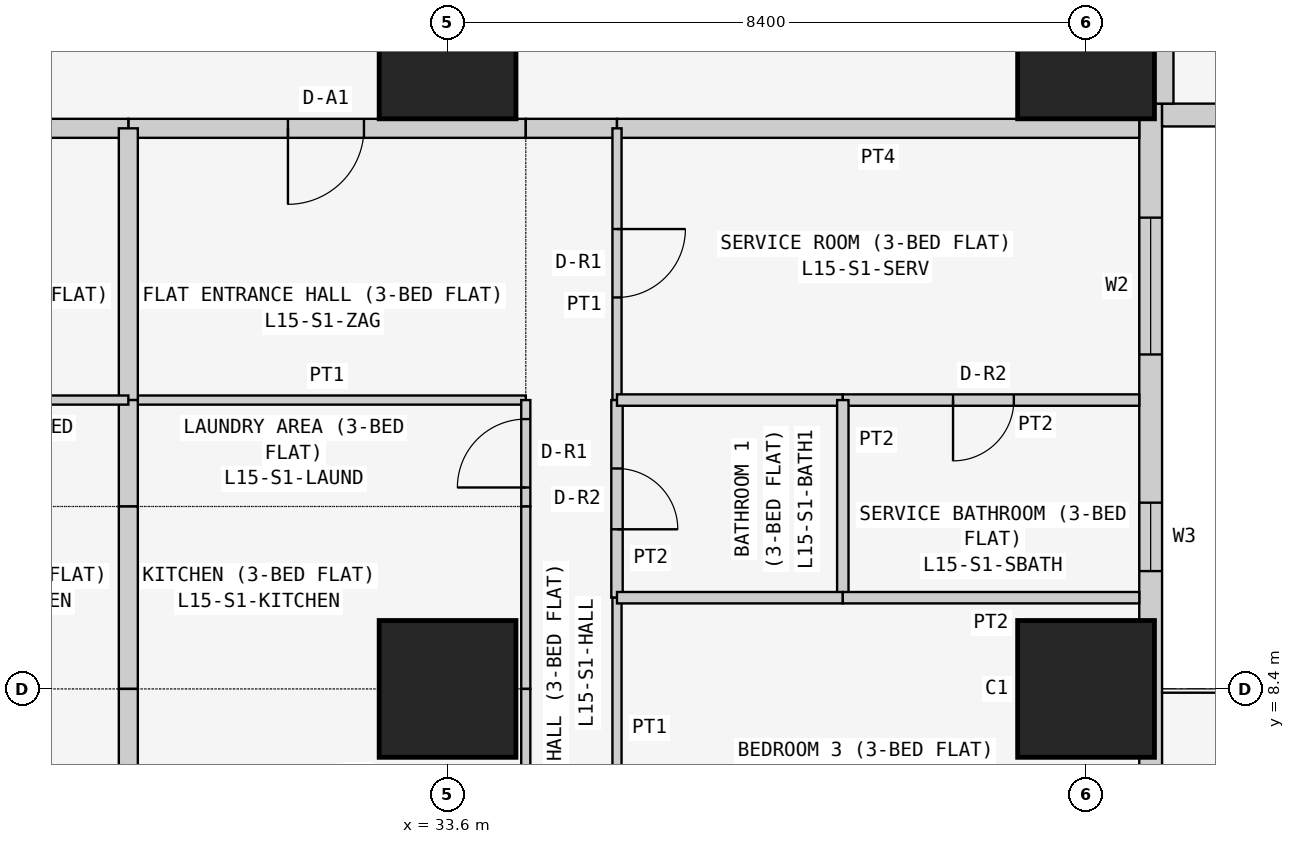
"""IFC4 building model, lengths in metres.
Left out: names, types, materials, properties, quantities, classifications, styles, units other than length and angle.
Written with IfcOpenShell. Run it as: python <this file> out.ifc"""

import sys

from ifc_helpers import new_model, si_unit, direction, frame, frame_2d, origin, origin_2d, place, context, subcontext, project, spatial, rectangle, extrude, element, fill, save


model = new_model("IFC4")
c1 = context("Model", 3, precision=1e-05, world=origin(), true_north=direction((0.0, 1.0)))
c2 = subcontext(c1, "Body", "Model", "MODEL_VIEW")
j1 = project(units=[si_unit("LENGTHUNIT", "METRE"), si_unit("PLANEANGLEUNIT", "RADIAN")], contexts=[c1])
p1 = place(None, origin())
s1 = spatial("IfcSite", under=j1, at=p1, CompositionType="ELEMENT")
p2 = place(p1, origin())
s2 = spatial("IfcBuilding", under=s1, at=p2, CompositionType="ELEMENT")
p3 = place(p2, frame((0.0, 0.0, 63.3)))
s3 = spatial("IfcBuildingStorey", under=s2, at=p3, CompositionType="ELEMENT", Elevation=63.3)
for number, where, z_axis, x_axis in (
    (1, (33.6, 8.4, 0.0), (0.0, 0.0, 1.0), (1.0, 0.0, 0.0)),
    (2, (33.6, 16.8, 0.0), (0.0, 0.0, 1.0), (1.0, 0.0, 0.0)),
    (3, (42.0, 8.4, 0.0), (0.0, 0.0, 1.0), (1.0, 0.0, 0.0)),
    (4, (42.0, 16.8, 0.0), (0.0, 0.0, 1.0), (1.0, 0.0, 0.0)),
):
    element("IfcColumn", number, at=place(p3, frame(where, z_axis=z_axis, x_axis=x_axis)), inside=s3, PredefinedType="COLUMN", context=c2, shape_type="SweptSolid", body=[
        extrude(rectangle(XDim=1.8, YDim=1.8, at=origin_2d()), origin(), (0.0, 0.0, 1.0), 3.6),
    ])
p4 = place(p3, frame((42.85, 0.4, 0.0), z_axis=(0.0, 0.0, 1.0), x_axis=(0.0, 1.0, 0.0)))
e5 = element("IfcWall", 5, at=p4, inside=s3, PredefinedType="SOLIDWALL", context=c2, shape_type="SweptSolid", body=[
    extrude(rectangle(XDim=15.7, YDim=0.3, at=frame_2d((7.85, 0.0))), origin(), (0.0, 0.0, 1.0), 3.45),
])
p5 = place(p4, frame((12.4, 0.0, 0.9)))
e6 = element("IfcOpeningElement", 6, at=p5, cuts=e5, PredefinedType="OPENING", context=c2, shape_type="SweptSolid", body=[
    extrude(rectangle(XDim=1.8, YDim=1.5, at=frame_2d((0.9, 0.75))), frame((0.0, 0.16, 0.0), z_axis=(0.0, -1.0, 0.0), x_axis=(1.0, 0.0, 0.0)), (0.0, 0.0, 1.0), 0.32),
])
p6 = place(p4, frame((9.55, 0.0, 1.5)))
e7 = element("IfcOpeningElement", 7, at=p6, cuts=e5, PredefinedType="OPENING", context=c2, shape_type="SweptSolid", body=[
    extrude(rectangle(XDim=0.9, YDim=0.7, at=frame_2d((0.45, 0.35))), frame((0.0, 0.16, 0.0), z_axis=(0.0, -1.0, 0.0), x_axis=(1.0, 0.0, 0.0)), (0.0, 0.0, 1.0), 0.32),
])
p7 = place(p4, frame((5.1, 0.0, 0.9)))
e8 = element("IfcOpeningElement", 8, at=p7, cuts=e5, PredefinedType="OPENING", context=c2, shape_type="SweptSolid", body=[
    extrude(rectangle(XDim=1.8, YDim=1.5, at=frame_2d((0.9, 0.75))), frame((0.0, 0.16, 0.0), z_axis=(0.0, -1.0, 0.0), x_axis=(1.0, 0.0, 0.0)), (0.0, 0.0, 1.0), 0.32),
])
p8 = place(p4, frame((2.0, 0.0, 0.0)))
e9 = element("IfcOpeningElement", 9, at=p8, cuts=e5, PredefinedType="OPENING", context=c2, shape_type="SweptSolid", body=[
    extrude(rectangle(XDim=0.9, YDim=2.4, at=frame_2d((0.45, 1.2))), frame((0.0, 0.16, 0.0), z_axis=(0.0, -1.0, 0.0), x_axis=(1.0, 0.0, 0.0)), (0.0, 0.0, 1.0), 0.32),
])
p9 = place(p4, frame((0.7, 0.0, 0.9)))
e10 = element("IfcOpeningElement", 10, at=p9, cuts=e5, PredefinedType="OPENING", context=c2, shape_type="SweptSolid", body=[
    extrude(rectangle(XDim=1.2, YDim=1.5, at=frame_2d((0.6, 0.75))), frame((0.0, 0.16, 0.0), z_axis=(0.0, -1.0, 0.0), x_axis=(1.0, 0.0, 0.0)), (0.0, 0.0, 1.0), 0.32),
])
p10 = place(p3, frame((43.0, 15.95, 0.0), z_axis=(0.0, 0.0, 1.0), x_axis=(1.0, 0.0, 0.0)))
e11 = element("IfcWall", 11, at=p10, inside=s3, PredefinedType="SOLIDWALL", context=c2, shape_type="SweptSolid", body=[
    extrude(rectangle(XDim=15.4, YDim=0.3, at=frame_2d((7.7, 0.0))), origin(), (0.0, 0.0, 1.0), 3.45),
])
p11 = place(p10, frame((1.2, 0.0, 0.9)))
e12 = element("IfcOpeningElement", 12, at=p11, cuts=e11, PredefinedType="OPENING", context=c2, shape_type="SweptSolid", body=[
    extrude(rectangle(XDim=1.8, YDim=1.5, at=frame_2d((0.9, 0.75))), frame((0.0, 0.16, 0.0), z_axis=(0.0, -1.0, 0.0), x_axis=(1.0, 0.0, 0.0)), (0.0, 0.0, 1.0), 0.32),
])
p12 = place(p10, frame((4.95, 0.0, 1.5)))
e13 = element("IfcOpeningElement", 13, at=p12, cuts=e11, PredefinedType="OPENING", context=c2, shape_type="SweptSolid", body=[
    extrude(rectangle(XDim=0.9, YDim=0.7, at=frame_2d((0.45, 0.35))), frame((0.0, 0.16, 0.0), z_axis=(0.0, -1.0, 0.0), x_axis=(1.0, 0.0, 0.0)), (0.0, 0.0, 1.0), 0.32),
])
p13 = place(p10, frame((8.5, 0.0, 0.9)))
e14 = element("IfcOpeningElement", 14, at=p13, cuts=e11, PredefinedType="OPENING", context=c2, shape_type="SweptSolid", body=[
    extrude(rectangle(XDim=1.8, YDim=1.5, at=frame_2d((0.9, 0.75))), frame((0.0, 0.16, 0.0), z_axis=(0.0, -1.0, 0.0), x_axis=(1.0, 0.0, 0.0)), (0.0, 0.0, 1.0), 0.32),
])
p14 = place(p10, frame((12.5, 0.0, 0.0)))
e15 = element("IfcOpeningElement", 15, at=p14, cuts=e11, PredefinedType="OPENING", context=c2, shape_type="SweptSolid", body=[
    extrude(rectangle(XDim=0.9, YDim=2.4, at=frame_2d((0.45, 1.2))), frame((0.0, 0.16, 0.0), z_axis=(0.0, -1.0, 0.0), x_axis=(1.0, 0.0, 0.0)), (0.0, 0.0, 1.0), 0.32),
])
p15 = place(p10, frame((13.5, 0.0, 0.9)))
e16 = element("IfcOpeningElement", 16, at=p15, cuts=e11, PredefinedType="OPENING", context=c2, shape_type="SweptSolid", body=[
    extrude(rectangle(XDim=1.2, YDim=1.5, at=frame_2d((0.6, 0.75))), frame((0.0, 0.16, 0.0), z_axis=(0.0, -1.0, 0.0), x_axis=(1.0, 0.0, 0.0)), (0.0, 0.0, 1.0), 0.32),
])
p16 = place(p3, frame((43.025, 22.971, 0.0), z_axis=(0.0, 0.0, 1.0), x_axis=(0.0, -1.0, 0.0)))
e17 = element("IfcWall", 17, at=p16, inside=s3, PredefinedType="PARTITIONING", context=c2, shape_type="SweptSolid", body=[
    extrude(rectangle(XDim=6.871, YDim=0.25, at=frame_2d((3.436, 0.0))), origin(), (0.0, 0.0, 1.0), 3.45),
])
p17 = place(p3, frame((34.629, 15.775, 0.0), z_axis=(0.0, 0.0, 1.0), x_axis=(-1.0, 0.0, 0.0)))
e18 = element("IfcWall", 18, at=p17, inside=s3, PredefinedType="PARTITIONING", context=c2, shape_type="SweptSolid", body=[
    extrude(rectangle(XDim=5.229, YDim=0.25, at=frame_2d((2.615, 0.0))), origin(), (0.0, 0.0, 1.0), 3.45),
])
p18 = place(p17, frame((2.129, 0.0, 0.0)))
e19 = element("IfcOpeningElement", 19, at=p18, cuts=e18, PredefinedType="OPENING", context=c2, shape_type="SweptSolid", body=[
    extrude(rectangle(XDim=1.0, YDim=2.1, at=frame_2d((0.5, 1.05))), frame((0.0, 0.135, 0.0), z_axis=(0.0, -1.0, 0.0), x_axis=(1.0, 0.0, 0.0)), (0.0, 0.0, 1.0), 0.27),
])
p19 = place(p3, frame((35.829, 15.775, 0.0), z_axis=(0.0, 0.0, 1.0), x_axis=(-1.0, 0.0, 0.0)))
e20 = element("IfcWall", 20, at=p19, inside=s3, PredefinedType="PARTITIONING", context=c2, shape_type="SweptSolid", body=[
    extrude(rectangle(XDim=1.2, YDim=0.25, at=frame_2d((0.6, 0.0))), origin(), (0.0, 0.0, 1.0), 3.45),
])
p20 = place(p3, frame((42.7, 15.775, 0.0), z_axis=(0.0, 0.0, 1.0), x_axis=(-1.0, 0.0, 0.0)))
e21 = element("IfcWall", 21, at=p20, inside=s3, PredefinedType="PARTITIONING", context=c2, shape_type="SweptSolid", body=[
    extrude(rectangle(XDim=6.871, YDim=0.25, at=frame_2d((3.436, 0.0))), origin(), (0.0, 0.0, 1.0), 3.45),
])
p21 = place(p3, frame((29.4, 15.775, 0.0), z_axis=(0.0, 0.0, 1.0), x_axis=(-1.0, 0.0, 0.0)))
e22 = element("IfcWall", 22, at=p21, inside=s3, PredefinedType="PARTITIONING", context=c2, shape_type="SweptSolid", body=[
    extrude(rectangle(XDim=5.229, YDim=0.25, at=frame_2d((2.615, 0.0))), origin(), (0.0, 0.0, 1.0), 3.45),
])
p22 = place(p21, frame((2.1, 0.0, 0.0)))
e23 = element("IfcOpeningElement", 23, at=p22, cuts=e22, PredefinedType="OPENING", context=c2, shape_type="SweptSolid", body=[
    extrude(rectangle(XDim=1.0, YDim=2.1, at=frame_2d((0.5, 1.05))), frame((0.0, 0.135, 0.0), z_axis=(0.0, -1.0, 0.0), x_axis=(1.0, 0.0, 0.0)), (0.0, 0.0, 1.0), 0.27),
])
p23 = place(p3, frame((29.4, 12.2, 0.0), z_axis=(0.0, 0.0, 1.0), x_axis=(1.0, 0.0, 0.0)))
e24 = element("IfcWall", 24, at=p23, inside=s3, PredefinedType="PARTITIONING", context=c2, shape_type="SweptSolid", body=[
    extrude(rectangle(XDim=5.229, YDim=0.12, at=frame_2d((2.615, 0.0))), origin(), (0.0, 0.0, 1.0), 3.45),
])
p24 = place(p3, frame((29.4, 15.775, 0.0), z_axis=(0.0, 0.0, 1.0), x_axis=(0.0, -1.0, 0.0)))
e25 = element("IfcWall", 25, at=p24, inside=s3, PredefinedType="PARTITIONING", context=c2, shape_type="SweptSolid", body=[
    extrude(rectangle(XDim=3.575, YDim=0.25, at=frame_2d((1.788, 0.0))), origin(), (0.0, 0.0, 1.0), 2.848),
])
p25 = place(p3, frame((34.629, 10.8, 0.0), z_axis=(0.0, 0.0, 1.0), x_axis=(0.0, 1.0, 0.0)))
e26 = element("IfcWall", 26, at=p25, inside=s3, PredefinedType="PARTITIONING", context=c2, shape_type="SweptSolid", body=[
    extrude(rectangle(XDim=1.4, YDim=0.12, at=frame_2d((0.7, 0.0))), origin(), (0.0, 0.0, 1.0), 3.45),
])
p26 = place(p25, frame((0.25, 0.0, 0.0)))
e27 = element("IfcOpeningElement", 27, at=p26, cuts=e26, PredefinedType="OPENING", context=c2, shape_type="SweptSolid", body=[
    extrude(rectangle(XDim=0.9, YDim=2.1, at=frame_2d((0.45, 1.05))), frame((0.0, 0.07, 0.0), z_axis=(0.0, -1.0, 0.0), x_axis=(1.0, 0.0, 0.0)), (0.0, 0.0, 1.0), 0.14),
])
p27 = place(p3, frame((29.4, 12.2, 0.0), z_axis=(0.0, 0.0, 1.0), x_axis=(0.0, -1.0, 0.0)))
e28 = element("IfcWall", 28, at=p27, inside=s3, PredefinedType="PARTITIONING", context=c2, shape_type="SweptSolid", body=[
    extrude(rectangle(XDim=1.4, YDim=0.25, at=frame_2d((0.7, 0.0))), origin(), (0.0, 0.0, 1.0), 2.848),
])
p28 = place(p3, frame((34.629, 8.4, 0.0), z_axis=(0.0, 0.0, 1.0), x_axis=(0.0, 1.0, 0.0)))
e29 = element("IfcWall", 29, at=p28, inside=s3, PredefinedType="PARTITIONING", context=c2, shape_type="SweptSolid", body=[
    extrude(rectangle(XDim=2.4, YDim=0.12, at=frame_2d((1.2, 0.0))), origin(), (0.0, 0.0, 1.0), 3.45),
])
p29 = place(p3, frame((29.4, 10.8, 0.0), z_axis=(0.0, 0.0, 1.0), x_axis=(0.0, -1.0, 0.0)))
e30 = element("IfcWall", 30, at=p29, inside=s3, PredefinedType="PARTITIONING", context=c2, shape_type="SweptSolid", body=[
    extrude(rectangle(XDim=2.4, YDim=0.25, at=frame_2d((1.2, 0.0))), origin(), (0.0, 0.0, 1.0), 2.848),
])
p30 = place(p3, frame((34.629, 3.5, 0.0), z_axis=(0.0, 0.0, 1.0), x_axis=(0.0, 1.0, 0.0)))
e31 = element("IfcWall", 31, at=p30, inside=s3, PredefinedType="PARTITIONING", context=c2, shape_type="SweptSolid", body=[
    extrude(rectangle(XDim=4.9, YDim=0.12, at=frame_2d((2.45, 0.0))), origin(), (0.0, 0.0, 1.0), 3.45),
])
p31 = place(p30, frame((1.25, 0.0, 0.0)))
e32 = element("IfcOpeningElement", 32, at=p31, cuts=e31, PredefinedType="OPENING", context=c2, shape_type="SweptSolid", body=[
    extrude(rectangle(XDim=0.9, YDim=2.1, at=frame_2d((0.45, 1.05))), frame((0.0, 0.07, 0.0), z_axis=(0.0, -1.0, 0.0), x_axis=(1.0, 0.0, 0.0)), (0.0, 0.0, 1.0), 0.14),
])
p32 = place(p3, frame((29.4, 8.4, 0.0), z_axis=(0.0, 0.0, 1.0), x_axis=(0.0, -1.0, 0.0)))
e33 = element("IfcWall", 33, at=p32, inside=s3, PredefinedType="PARTITIONING", context=c2, shape_type="SweptSolid", body=[
    extrude(rectangle(XDim=9.05, YDim=0.25, at=frame_2d((4.525, 0.0))), origin(), (0.0, 0.0, 1.0), 2.848),
])
p33 = place(p3, frame((35.829, 12.2, 0.0), z_axis=(0.0, 0.0, 1.0), x_axis=(0.0, 1.0, 0.0)))
e34 = element("IfcWall", 34, at=p33, inside=s3, PredefinedType="PARTITIONING", context=c2, shape_type="SweptSolid", body=[
    extrude(rectangle(XDim=3.575, YDim=0.12, at=frame_2d((1.788, 0.0))), origin(), (0.0, 0.0, 1.0), 3.45),
])
p34 = place(p33, frame((1.35, 0.0, 0.0)))
e35 = element("IfcOpeningElement", 35, at=p34, cuts=e34, PredefinedType="OPENING", context=c2, shape_type="SweptSolid", body=[
    extrude(rectangle(XDim=0.9, YDim=2.1, at=frame_2d((0.45, 1.05))), frame((0.0, 0.07, 0.0), z_axis=(0.0, -1.0, 0.0), x_axis=(1.0, 0.0, 0.0)), (0.0, 0.0, 1.0), 0.14),
])
p35 = place(p3, frame((35.829, 9.6, 0.0), z_axis=(0.0, 0.0, 1.0), x_axis=(0.0, 1.0, 0.0)))
e36 = element("IfcWall", 36, at=p35, inside=s3, PredefinedType="PARTITIONING", context=c2, shape_type="SweptSolid", body=[
    extrude(rectangle(XDim=2.6, YDim=0.15, at=frame_2d((1.3, 0.0))), origin(), (0.0, 0.0, 1.0), 3.45),
])
p36 = place(p35, frame((0.9, 0.0, 0.0)))
e37 = element("IfcOpeningElement", 37, at=p36, cuts=e36, PredefinedType="OPENING", context=c2, shape_type="SweptSolid", body=[
    extrude(rectangle(XDim=0.8, YDim=2.1, at=frame_2d((0.4, 1.05))), frame((0.0, 0.085, 0.0), z_axis=(0.0, -1.0, 0.0), x_axis=(1.0, 0.0, 0.0)), (0.0, 0.0, 1.0), 0.17),
])
p37 = place(p3, frame((35.829, 4.7, 0.0), z_axis=(0.0, 0.0, 1.0), x_axis=(0.0, 1.0, 0.0)))
e38 = element("IfcWall", 38, at=p37, inside=s3, PredefinedType="PARTITIONING", context=c2, shape_type="SweptSolid", body=[
    extrude(rectangle(XDim=4.9, YDim=0.12, at=frame_2d((2.45, 0.0))), origin(), (0.0, 0.0, 1.0), 3.45),
])
p38 = place(p37, frame((1.65, 0.0, 0.0)))
e39 = element("IfcOpeningElement", 39, at=p38, cuts=e38, PredefinedType="OPENING", context=c2, shape_type="SweptSolid", body=[
    extrude(rectangle(XDim=0.9, YDim=2.1, at=frame_2d((0.45, 1.05))), frame((0.0, 0.07, 0.0), z_axis=(0.0, -1.0, 0.0), x_axis=(1.0, 0.0, 0.0)), (0.0, 0.0, 1.0), 0.14),
])
p39 = place(p3, frame((35.829, 12.2, 0.0), z_axis=(0.0, 0.0, 1.0), x_axis=(1.0, 0.0, 0.0)))
e40 = element("IfcWall", 40, at=p39, inside=s3, PredefinedType="PARTITIONING", context=c2, shape_type="SweptSolid", body=[
    extrude(rectangle(XDim=2.971, YDim=0.15, at=frame_2d((1.485, 0.0))), origin(), (0.0, 0.0, 1.0), 3.45),
])
p40 = place(p3, frame((38.8, 12.2, 0.0), z_axis=(0.0, 0.0, 1.0), x_axis=(1.0, 0.0, 0.0)))
e41 = element("IfcWall", 41, at=p40, inside=s3, PredefinedType="PARTITIONING", context=c2, shape_type="SweptSolid", body=[
    extrude(rectangle(XDim=3.9, YDim=0.15, at=frame_2d((1.95, 0.0))), origin(), (0.0, 0.0, 1.0), 3.45),
])
p41 = place(p40, frame((1.45, 0.0, 0.0)))
e42 = element("IfcOpeningElement", 42, at=p41, cuts=e41, PredefinedType="OPENING", context=c2, shape_type="SweptSolid", body=[
    extrude(rectangle(XDim=0.8, YDim=2.1, at=frame_2d((0.4, 1.05))), frame((0.0, 0.085, 0.0), z_axis=(0.0, -1.0, 0.0), x_axis=(1.0, 0.0, 0.0)), (0.0, 0.0, 1.0), 0.17),
])
p42 = place(p3, frame((38.8, 9.6, 0.0), z_axis=(0.0, 0.0, 1.0), x_axis=(0.0, 1.0, 0.0)))
e43 = element("IfcWall", 43, at=p42, inside=s3, PredefinedType="PARTITIONING", context=c2, shape_type="SweptSolid", body=[
    extrude(rectangle(XDim=2.6, YDim=0.15, at=frame_2d((1.3, 0.0))), origin(), (0.0, 0.0, 1.0), 3.45),
])
p43 = place(p3, frame((35.829, 9.6, 0.0), z_axis=(0.0, 0.0, 1.0), x_axis=(1.0, 0.0, 0.0)))
e44 = element("IfcWall", 44, at=p43, inside=s3, PredefinedType="PARTITIONING", context=c2, shape_type="SweptSolid", body=[
    extrude(rectangle(XDim=2.971, YDim=0.15, at=frame_2d((1.485, 0.0))), origin(), (0.0, 0.0, 1.0), 3.45),
])
p44 = place(p3, frame((38.8, 9.6, 0.0), z_axis=(0.0, 0.0, 1.0), x_axis=(1.0, 0.0, 0.0)))
e45 = element("IfcWall", 45, at=p44, inside=s3, PredefinedType="PARTITIONING", context=c2, shape_type="SweptSolid", body=[
    extrude(rectangle(XDim=3.9, YDim=0.15, at=frame_2d((1.95, 0.0))), origin(), (0.0, 0.0, 1.0), 3.45),
])
p45 = place(p3, frame((29.4, 12.2, 0.0), z_axis=(0.0, 0.0, 1.0), x_axis=(-1.0, 0.0, 0.0)))
e46 = element("IfcWall", 46, at=p45, inside=s3, PredefinedType="PARTITIONING", context=c2, shape_type="SweptSolid", body=[
    extrude(rectangle(XDim=5.229, YDim=0.12, at=frame_2d((2.615, 0.0))), origin(), (0.0, 0.0, 1.0), 3.45),
])
p46 = place(p5, origin())
e47 = element("IfcWindow", 47, at=p46, inside=s3, PartitioningType="SINGLE_PANEL", PredefinedType="WINDOW", context=c2, shape_type="SweptSolid", body=[
    extrude(rectangle(XDim=1.8, YDim=1.5, at=frame_2d((0.9, 0.75))), frame((0.0, 0.03, 0.0), z_axis=(0.0, -1.0, 0.0), x_axis=(1.0, 0.0, 0.0)), (0.0, 0.0, 1.0), 0.06),
])
fill(e6, e47)
p47 = place(p6, origin())
e48 = element("IfcWindow", 48, at=p47, inside=s3, PartitioningType="SINGLE_PANEL", PredefinedType="WINDOW", context=c2, shape_type="SweptSolid", body=[
    extrude(rectangle(XDim=0.9, YDim=0.7, at=frame_2d((0.45, 0.35))), frame((0.0, 0.03, 0.0), z_axis=(0.0, -1.0, 0.0), x_axis=(1.0, 0.0, 0.0)), (0.0, 0.0, 1.0), 0.06),
])
fill(e7, e48)
p48 = place(p18, origin())
e49 = element("IfcDoor", 49, at=p48, inside=s3, OperationType="SINGLE_SWING_RIGHT", PredefinedType="DOOR", context=c2, shape_type="SweptSolid", body=[
    extrude(rectangle(XDim=1.0, YDim=2.1, at=frame_2d((0.5, 1.05))), frame((0.0, 0.025, 0.0), z_axis=(0.0, -1.0, 0.0), x_axis=(1.0, 0.0, 0.0)), (0.0, 0.0, 1.0), 0.05),
])
fill(e19, e49)
p49 = place(p26, origin())
e50 = element("IfcDoor", 50, at=p49, inside=s3, OperationType="SINGLE_SWING_LEFT", PredefinedType="DOOR", context=c2, shape_type="SweptSolid", body=[
    extrude(rectangle(XDim=0.9, YDim=2.1, at=frame_2d((0.45, 1.05))), frame((0.0, 0.025, 0.0), z_axis=(0.0, -1.0, 0.0), x_axis=(1.0, 0.0, 0.0)), (0.0, 0.0, 1.0), 0.05),
])
fill(e27, e50)
p50 = place(p34, frame((0.9, 0.0, 0.0), z_axis=(0.0, 0.0, 1.0), x_axis=(-1.0, 0.0, 0.0)))
e51 = element("IfcDoor", 51, at=p50, inside=s3, OperationType="SINGLE_SWING_LEFT", PredefinedType="DOOR", context=c2, shape_type="SweptSolid", body=[
    extrude(rectangle(XDim=0.9, YDim=2.1, at=frame_2d((0.45, 1.05))), frame((0.0, 0.025, 0.0), z_axis=(0.0, -1.0, 0.0), x_axis=(1.0, 0.0, 0.0)), (0.0, 0.0, 1.0), 0.05),
])
fill(e35, e51)
p51 = place(p41, frame((0.8, 0.0, 0.0), z_axis=(0.0, 0.0, 1.0), x_axis=(-1.0, 0.0, 0.0)))
e52 = element("IfcDoor", 52, at=p51, inside=s3, OperationType="SINGLE_SWING_RIGHT", PredefinedType="DOOR", context=c2, shape_type="SweptSolid", body=[
    extrude(rectangle(XDim=0.8, YDim=2.1, at=frame_2d((0.4, 1.05))), frame((0.0, 0.025, 0.0), z_axis=(0.0, -1.0, 0.0), x_axis=(1.0, 0.0, 0.0)), (0.0, 0.0, 1.0), 0.05),
])
fill(e42, e52)
p52 = place(p36, frame((0.8, 0.0, 0.0), z_axis=(0.0, 0.0, 1.0), x_axis=(-1.0, 0.0, 0.0)))
e53 = element("IfcDoor", 53, at=p52, inside=s3, OperationType="SINGLE_SWING_RIGHT", PredefinedType="DOOR", context=c2, shape_type="SweptSolid", body=[
    extrude(rectangle(XDim=0.8, YDim=2.1, at=frame_2d((0.4, 1.05))), frame((0.0, 0.025, 0.0), z_axis=(0.0, -1.0, 0.0), x_axis=(1.0, 0.0, 0.0)), (0.0, 0.0, 1.0), 0.05),
])
fill(e37, e53)
save(model, sys.argv[1])
